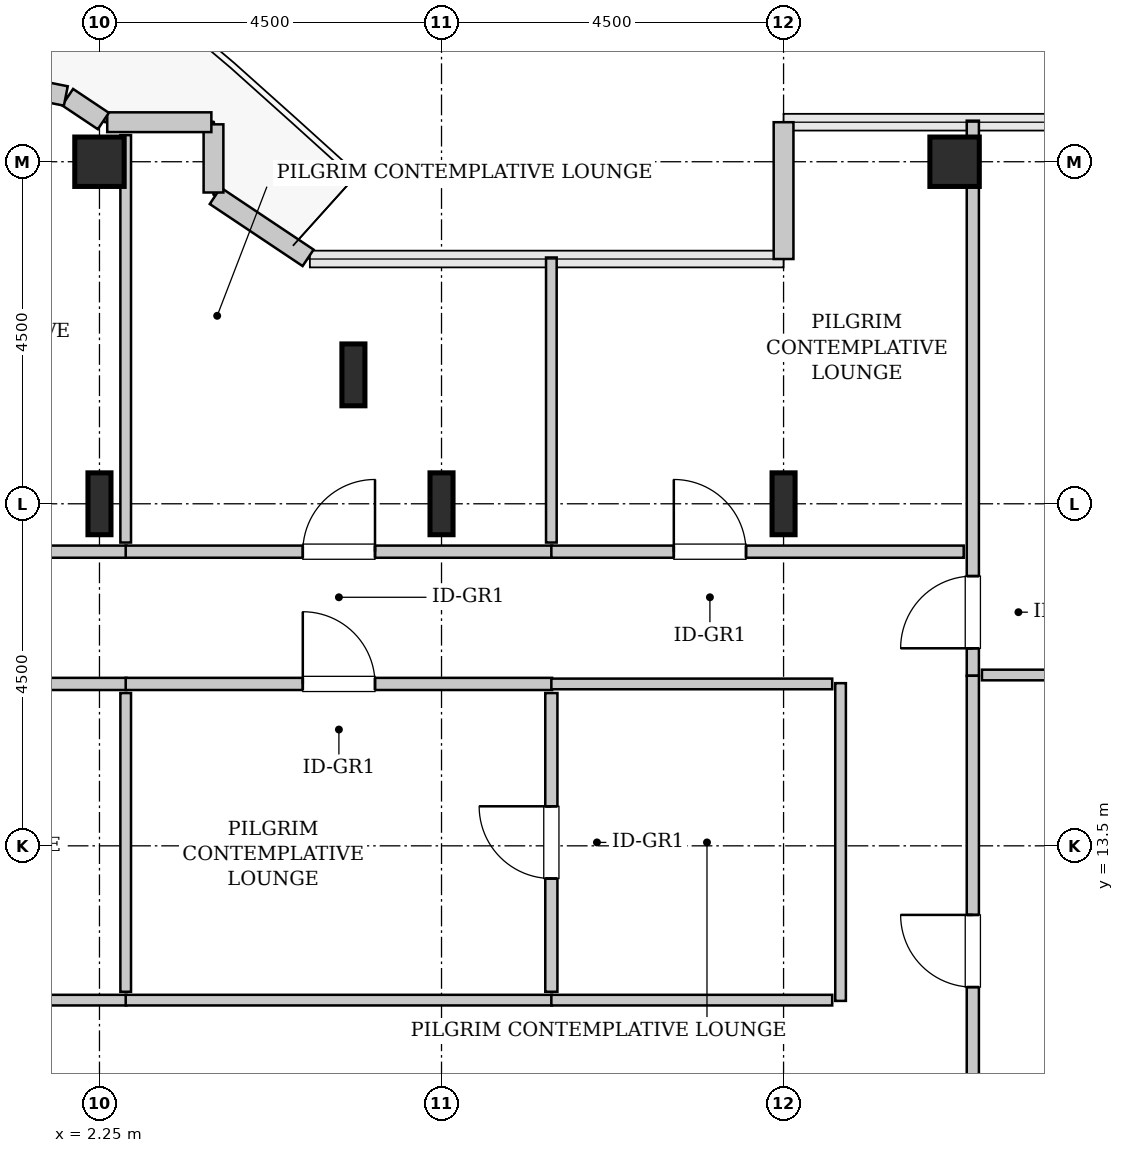
"""IFC4 building model, lengths in metres.
Left out: names, types, materials, properties, quantities, classifications, styles, units other than length and angle.
Written with IfcOpenShell. Run it as: python <this file> out.ifc"""

import sys

from ifc_helpers import new_model, si_unit, direction, frame, frame_2d, origin, origin_2d, place, context, subcontext, project, spatial, rectangle, hollow_rectangle, i_section, extrude, source, transform, mapped, element, fill, save


model = new_model("IFC4")
c1 = context("Model", 3, precision=1e-05, world=origin(), true_north=direction((0.0, 1.0)))
c2 = subcontext(c1, "Body", "Model", "MODEL_VIEW")
j1 = project(units=[si_unit("LENGTHUNIT", "METRE"), si_unit("PLANEANGLEUNIT", "RADIAN")], contexts=[c1])
p1 = place(None, origin())
s1 = spatial("IfcSite", under=j1, at=p1, CompositionType="ELEMENT")
p2 = place(p1, origin())
s2 = spatial("IfcBuilding", under=s1, at=p2, CompositionType="ELEMENT")
p3 = place(p2, frame((0.0, 0.0, 256.0)))
s3 = spatial("IfcBuildingStorey", under=s2, at=p3, CompositionType="ELEMENT", Elevation=256.0)
m1 = source(origin(), c2, "Body", "SweptSolid", [
    extrude(i_section(OverallWidth=0.303, OverallDepth=0.814, WebThickness=0.021, FlangeThickness=0.04, FilletRadius=0.03, at=origin_2d()), origin(), (0.0, 0.0, 1.0), 3.8),
])
p4 = place(p3, frame((2.25, 18.0, 0.0), z_axis=(0.0, 0.0, 1.0), x_axis=(1.0, 0.0, 0.0)))
e1 = element("IfcColumn", 1, at=p4, inside=s3, PredefinedType="COLUMN", context=c2, shape_type="MappedRepresentation", body=[
    mapped(m1, transform((0.0, 0.0, 0.0), x_axis=(1.0, 0.0, 0.0), y_axis=(0.0, 1.0, 0.0), z_axis=(0.0, 0.0, 1.0), scale=1.0)),
])
m2 = source(origin(), c2, "Body", "SweptSolid", [
    extrude(hollow_rectangle(XDim=0.65, YDim=0.65, WallThickness=0.032, InnerFilletRadius=0.032, OuterFilletRadius=0.064, at=origin_2d()), origin(), (0.0, 0.0, 1.0), 3.8),
])
p5 = place(p3, frame((2.25, 22.5, 0.0), z_axis=(0.0, 0.0, 1.0), x_axis=(1.0, 0.0, 0.0)))
e2 = element("IfcColumn", 2, at=p5, inside=s3, PredefinedType="COLUMN", context=c2, shape_type="MappedRepresentation", body=[
    mapped(m2, transform((0.0, 0.0, 0.0), x_axis=(1.0, 0.0, 0.0), y_axis=(0.0, 1.0, 0.0), z_axis=(0.0, 0.0, 1.0), scale=1.0)),
])
for number, where, z_axis, x_axis in (
    (3, (5.591, 19.696, 0.0), (0.0, 0.0, 1.0), (1.0, 0.0, 0.0)),
    (4, (6.75, 18.0, 0.0), (0.0, 0.0, 1.0), (1.0, 0.0, 0.0)),
    (5, (11.25, 18.0, 0.0), (0.0, 0.0, 1.0), (1.0, 0.0, 0.0)),
):
    element("IfcColumn", number, at=place(p3, frame(where, z_axis=z_axis, x_axis=x_axis)), inside=s3, PredefinedType="COLUMN", context=c2, shape_type="MappedRepresentation", body=[
        mapped(m1, transform((0.0, 0.0, 0.0), x_axis=(1.0, 0.0, 0.0), y_axis=(0.0, 1.0, 0.0), z_axis=(0.0, 0.0, 1.0), scale=1.0)),
    ])
p6 = place(p3, frame((13.5, 22.5, 0.0), z_axis=(0.0, 0.0, 1.0), x_axis=(1.0, 0.0, 0.0)))
e6 = element("IfcColumn", 6, at=p6, inside=s3, PredefinedType="COLUMN", context=c2, shape_type="MappedRepresentation", body=[
    mapped(m2, transform((0.0, 0.0, 0.0), x_axis=(1.0, 0.0, 0.0), y_axis=(0.0, 1.0, 0.0), z_axis=(0.0, 0.0, 1.0), scale=1.0)),
])
m3 = source(origin(), c2, "Body", "SweptSolid", [
    extrude(rectangle(XDim=1.8, YDim=0.26, at=frame_2d((0.9, 0.0))), origin(), (0.0, 0.0, 1.0), 3.5),
])
p7 = place(p3, frame((11.25, 23.02, 0.0), z_axis=(0.0, 0.0, 1.0), x_axis=(0.0, -1.0, 0.0)))
e7 = element("IfcWall", 7, at=p7, inside=s3, PredefinedType="SOLIDWALL", context=c2, shape_type="MappedRepresentation", body=[
    mapped(m3, transform((0.0, 0.0, 0.0), x_axis=(1.0, 0.0, 0.0), y_axis=(0.0, 1.0, 0.0), z_axis=(0.0, 0.0, 1.0), scale=1.0)),
])
m4 = source(origin(), c2, "Body", "SweptSolid", [
    extrude(rectangle(XDim=1.469, YDim=0.26, at=frame_2d((0.734, 0.0))), origin(), (0.0, 0.0, 1.0), 3.5),
])
p8 = place(p3, frame((4.995, 21.236, 0.0), z_axis=(0.0, 0.0, 1.0), x_axis=(-0.831461760506, 0.555581983884, 0.0)))
e8 = element("IfcWall", 8, at=p8, inside=s3, PredefinedType="SOLIDWALL", context=c2, shape_type="MappedRepresentation", body=[
    mapped(m4, transform((0.0, 0.0, 0.0), x_axis=(1.0, 0.0, 0.0), y_axis=(0.0, 1.0, 0.0), z_axis=(0.0, 0.0, 1.0), scale=1.0)),
])
m5 = source(origin(), c2, "Body", "SweptSolid", [
    extrude(rectangle(XDim=0.897, YDim=0.26, at=frame_2d((0.448, 0.0))), origin(), (0.0, 0.0, 1.0), 3.5),
])
p9 = place(p3, frame((3.75, 22.095, 0.0), z_axis=(0.0, 0.0, 1.0), x_axis=(0.0, 1.0, 0.0)))
e9 = element("IfcWall", 9, at=p9, inside=s3, PredefinedType="SOLIDWALL", context=c2, shape_type="MappedRepresentation", body=[
    mapped(m5, transform((0.0, 0.0, 0.0), x_axis=(1.0, 0.0, 0.0), y_axis=(0.0, 1.0, 0.0), z_axis=(0.0, 0.0, 1.0), scale=1.0)),
])
m6 = source(origin(), c2, "Body", "SweptSolid", [
    extrude(rectangle(XDim=1.37, YDim=0.26, at=frame_2d((0.685, 0.0))), origin(), (0.0, 0.0, 1.0), 3.5),
])
p10 = place(p3, frame((3.722, 23.02, 0.0), z_axis=(0.0, 0.0, 1.0), x_axis=(-1.0, 0.0, 0.0)))
e10 = element("IfcWall", 10, at=p10, inside=s3, PredefinedType="SOLIDWALL", context=c2, shape_type="MappedRepresentation", body=[
    mapped(m6, transform((0.0, 0.0, 0.0), x_axis=(1.0, 0.0, 0.0), y_axis=(0.0, 1.0, 0.0), z_axis=(0.0, 0.0, 1.0), scale=1.0)),
])
m7 = source(origin(), c2, "Body", "SweptSolid", [
    extrude(rectangle(XDim=0.565, YDim=0.26, at=frame_2d((0.283, 0.0))), origin(), (0.0, 0.0, 1.0), 3.5),
])
p11 = place(p3, frame((2.301, 23.036, 0.0), z_axis=(0.0, 0.0, 1.0), x_axis=(-0.831651492666, 0.555297933317, 0.0)))
e11 = element("IfcWall", 11, at=p11, inside=s3, PredefinedType="SOLIDWALL", context=c2, shape_type="MappedRepresentation", body=[
    mapped(m7, transform((0.0, 0.0, 0.0), x_axis=(1.0, 0.0, 0.0), y_axis=(0.0, 1.0, 0.0), z_axis=(0.0, 0.0, 1.0), scale=1.0)),
])
m8 = source(origin(), c2, "Body", "SweptSolid", [
    extrude(rectangle(XDim=4.137, YDim=0.26, at=frame_2d((2.068, 0.0))), origin(), (0.0, 0.0, 1.0), 3.5),
])
p12 = place(p3, frame((1.807, 23.365, 0.0), z_axis=(0.0, 0.0, 1.0), x_axis=(-0.980782170794, 0.195105954428, 0.0)))
e12 = element("IfcWall", 12, at=p12, inside=s3, PredefinedType="SOLIDWALL", context=c2, shape_type="MappedRepresentation", body=[
    mapped(m8, transform((0.0, 0.0, 0.0), x_axis=(1.0, 0.0, 0.0), y_axis=(0.0, 1.0, 0.0), z_axis=(0.0, 0.0, 1.0), scale=1.0)),
])
p13 = place(p12, frame((0.488, 0.0, 0.0)))
e13 = element("IfcOpeningElement", 13, at=p13, cuts=e12, PredefinedType="OPENING", context=c2, shape_type="SweptSolid", body=[
    extrude(rectangle(XDim=1.1, YDim=2.2, at=frame_2d((0.55, 1.1))), frame((0.0, 0.14, 0.0), z_axis=(0.0, -1.0, 0.0), x_axis=(1.0, 0.0, 0.0)), (0.0, 0.0, 1.0), 0.28),
])
m9 = source(origin(), c2, "Body", "SweptSolid", [
    extrude(rectangle(XDim=7.302, YDim=0.16, at=frame_2d((3.651, 0.0))), origin(), (0.0, 0.0, 1.0), 3.485),
])
p14 = place(p3, frame((13.74, 15.738, 0.0), z_axis=(0.0, 0.0, 1.0), x_axis=(0.0, 1.0, 0.0)))
e14 = element("IfcWall", 14, at=p14, inside=s3, PredefinedType="PARTITIONING", context=c2, shape_type="MappedRepresentation", body=[
    mapped(m9, transform((0.0, 0.0, 0.0), x_axis=(1.0, 0.0, 0.0), y_axis=(0.0, 1.0, 0.0), z_axis=(0.0, 0.0, 1.0), scale=1.0)),
])
p15 = place(p14, frame((0.361, 0.0, 0.0)))
e15 = element("IfcOpeningElement", 15, at=p15, cuts=e14, PredefinedType="OPENING", context=c2, shape_type="SweptSolid", body=[
    extrude(rectangle(XDim=0.95, YDim=2.1, at=frame_2d((0.475, 1.05))), frame((0.0, 0.09, 0.0), z_axis=(0.0, -1.0, 0.0), x_axis=(1.0, 0.0, 0.0)), (0.0, 0.0, 1.0), 0.18),
])
m10 = source(origin(), c2, "Body", "SweptSolid", [
    extrude(rectangle(XDim=11.43, YDim=0.14, at=frame_2d((5.715, 0.0))), origin(), (0.0, 0.0, 1.0), 3.485),
])
p16 = place(p3, frame((13.86, 15.748, 0.0), z_axis=(0.0, 0.0, 1.0), x_axis=(1.0, 0.0, 0.0)))
e16 = element("IfcWall", 16, at=p16, inside=s3, PredefinedType="PARTITIONING", context=c2, shape_type="MappedRepresentation", body=[
    mapped(m10, transform((0.0, 0.0, 0.0), x_axis=(1.0, 0.0, 0.0), y_axis=(0.0, 1.0, 0.0), z_axis=(0.0, 0.0, 1.0), scale=1.0)),
])
m11 = source(origin(), c2, "Body", "SweptSolid", [
    extrude(rectangle(XDim=7.242, YDim=0.16, at=frame_2d((3.621, 0.0))), origin(), (0.0, 0.0, 1.0), 3.485),
])
p17 = place(p3, frame((13.74, 8.495, 0.0), z_axis=(0.0, 0.0, 1.0), x_axis=(0.0, 1.0, 0.0)))
e17 = element("IfcWall", 17, at=p17, inside=s3, PredefinedType="PARTITIONING", context=c2, shape_type="MappedRepresentation", body=[
    mapped(m11, transform((0.0, 0.0, 0.0), x_axis=(1.0, 0.0, 0.0), y_axis=(0.0, 1.0, 0.0), z_axis=(0.0, 0.0, 1.0), scale=1.0)),
])
p18 = place(p17, frame((3.146, 0.0, 0.0)))
e18 = element("IfcOpeningElement", 18, at=p18, cuts=e17, PredefinedType="OPENING", context=c2, shape_type="SweptSolid", body=[
    extrude(rectangle(XDim=0.95, YDim=2.1, at=frame_2d((0.475, 1.05))), frame((0.0, 0.09, 0.0), z_axis=(0.0, -1.0, 0.0), x_axis=(1.0, 0.0, 0.0)), (0.0, 0.0, 1.0), 0.18),
])
m12 = source(origin(), c2, "Body", "SweptSolid", [
    extrude(rectangle(XDim=7.01, YDim=0.16, at=frame_2d((3.505, 0.0))), origin(), (0.0, 0.0, 1.0), 3.485),
])
p19 = place(p3, frame((-4.405, 17.37, 0.0), z_axis=(0.0, 0.0, 1.0), x_axis=(1.0, 0.0, 0.0)))
e19 = element("IfcWall", 19, at=p19, inside=s3, PredefinedType="PARTITIONING", context=c2, shape_type="MappedRepresentation", body=[
    mapped(m12, transform((0.0, 0.0, 0.0), x_axis=(1.0, 0.0, 0.0), y_axis=(0.0, 1.0, 0.0), z_axis=(0.0, 0.0, 1.0), scale=1.0)),
])
p20 = place(p19, frame((3.03, 0.0, 0.0)))
e20 = element("IfcOpeningElement", 20, at=p20, cuts=e19, PredefinedType="OPENING", context=c2, shape_type="SweptSolid", body=[
    extrude(rectangle(XDim=0.95, YDim=2.1, at=frame_2d((0.475, 1.05))), frame((0.0, 0.09, 0.0), z_axis=(0.0, -1.0, 0.0), x_axis=(1.0, 0.0, 0.0)), (0.0, 0.0, 1.0), 0.18),
])
m13 = source(origin(), c2, "Body", "SweptSolid", [
    extrude(rectangle(XDim=5.36, YDim=0.14, at=frame_2d((2.68, 0.0))), origin(), (0.0, 0.0, 1.0), 2.875),
])
p21 = place(p3, frame((2.595, 17.49, 0.0), z_axis=(0.0, 0.0, 1.0), x_axis=(0.0, 1.0, 0.0)))
e21 = element("IfcWall", 21, at=p21, inside=s3, PredefinedType="PARTITIONING", context=c2, shape_type="MappedRepresentation", body=[
    mapped(m13, transform((0.0, 0.0, 0.0), x_axis=(1.0, 0.0, 0.0), y_axis=(0.0, 1.0, 0.0), z_axis=(0.0, 0.0, 1.0), scale=1.0)),
])
p22 = place(p3, frame((-4.405, 15.63, 0.0), z_axis=(0.0, 0.0, 1.0), x_axis=(1.0, 0.0, 0.0)))
e22 = element("IfcWall", 22, at=p22, inside=s3, PredefinedType="PARTITIONING", context=c2, shape_type="MappedRepresentation", body=[
    mapped(m12, transform((0.0, 0.0, 0.0), x_axis=(1.0, 0.0, 0.0), y_axis=(0.0, 1.0, 0.0), z_axis=(0.0, 0.0, 1.0), scale=1.0)),
])
p23 = place(p22, frame((3.03, 0.0, 0.0)))
e23 = element("IfcOpeningElement", 23, at=p23, cuts=e22, PredefinedType="OPENING", context=c2, shape_type="SweptSolid", body=[
    extrude(rectangle(XDim=0.95, YDim=2.1, at=frame_2d((0.475, 1.05))), frame((0.0, 0.09, 0.0), z_axis=(0.0, -1.0, 0.0), x_axis=(1.0, 0.0, 0.0)), (0.0, 0.0, 1.0), 0.18),
])
m14 = source(origin(), c2, "Body", "SweptSolid", [
    extrude(rectangle(XDim=7.01, YDim=0.14, at=frame_2d((3.505, 0.0))), origin(), (0.0, 0.0, 1.0), 3.485),
])
p24 = place(p3, frame((-4.405, 11.47, 0.0), z_axis=(0.0, 0.0, 1.0), x_axis=(1.0, 0.0, 0.0)))
e24 = element("IfcWall", 24, at=p24, inside=s3, PredefinedType="PARTITIONING", context=c2, shape_type="MappedRepresentation", body=[
    mapped(m14, transform((0.0, 0.0, 0.0), x_axis=(1.0, 0.0, 0.0), y_axis=(0.0, 1.0, 0.0), z_axis=(0.0, 0.0, 1.0), scale=1.0)),
])
m15 = source(origin(), c2, "Body", "SweptSolid", [
    extrude(rectangle(XDim=3.93, YDim=0.14, at=frame_2d((1.965, 0.0))), origin(), (0.0, 0.0, 1.0), 3.485),
])
p25 = place(p3, frame((2.595, 11.58, 0.0), z_axis=(0.0, 0.0, 1.0), x_axis=(0.0, 1.0, 0.0)))
e25 = element("IfcWall", 25, at=p25, inside=s3, PredefinedType="PARTITIONING", context=c2, shape_type="MappedRepresentation", body=[
    mapped(m15, transform((0.0, 0.0, 0.0), x_axis=(1.0, 0.0, 0.0), y_axis=(0.0, 1.0, 0.0), z_axis=(0.0, 0.0, 1.0), scale=1.0)),
])
m16 = source(origin(), c2, "Body", "SweptSolid", [
    extrude(rectangle(XDim=5.61, YDim=0.16, at=frame_2d((2.805, 0.0))), origin(), (0.0, 0.0, 1.0), 3.485),
])
p26 = place(p3, frame((2.595, 17.37, 0.0), z_axis=(0.0, 0.0, 1.0), x_axis=(1.0, 0.0, 0.0)))
e26 = element("IfcWall", 26, at=p26, inside=s3, PredefinedType="PARTITIONING", context=c2, shape_type="MappedRepresentation", body=[
    mapped(m16, transform((0.0, 0.0, 0.0), x_axis=(1.0, 0.0, 0.0), y_axis=(0.0, 1.0, 0.0), z_axis=(0.0, 0.0, 1.0), scale=1.0)),
])
p27 = place(p26, frame((2.33, 0.0, 0.0)))
e27 = element("IfcOpeningElement", 27, at=p27, cuts=e26, PredefinedType="OPENING", context=c2, shape_type="SweptSolid", body=[
    extrude(rectangle(XDim=0.95, YDim=2.1, at=frame_2d((0.475, 1.05))), frame((0.0, 0.09, 0.0), z_axis=(0.0, -1.0, 0.0), x_axis=(1.0, 0.0, 0.0)), (0.0, 0.0, 1.0), 0.18),
])
m17 = source(origin(), c2, "Body", "SweptSolid", [
    extrude(rectangle(XDim=3.75, YDim=0.14, at=frame_2d((1.875, 0.0))), origin(), (0.0, 0.0, 1.0), 3.485),
])
p28 = place(p3, frame((8.195, 17.49, 0.0), z_axis=(0.0, 0.0, 1.0), x_axis=(0.0, 1.0, 0.0)))
e28 = element("IfcWall", 28, at=p28, inside=s3, PredefinedType="PARTITIONING", context=c2, shape_type="MappedRepresentation", body=[
    mapped(m17, transform((0.0, 0.0, 0.0), x_axis=(1.0, 0.0, 0.0), y_axis=(0.0, 1.0, 0.0), z_axis=(0.0, 0.0, 1.0), scale=1.0)),
])
p29 = place(p3, frame((2.595, 15.63, 0.0), z_axis=(0.0, 0.0, 1.0), x_axis=(1.0, 0.0, 0.0)))
e29 = element("IfcWall", 29, at=p29, inside=s3, PredefinedType="PARTITIONING", context=c2, shape_type="MappedRepresentation", body=[
    mapped(m16, transform((0.0, 0.0, 0.0), x_axis=(1.0, 0.0, 0.0), y_axis=(0.0, 1.0, 0.0), z_axis=(0.0, 0.0, 1.0), scale=1.0)),
])
p30 = place(p29, frame((2.33, 0.0, 0.0)))
e30 = element("IfcOpeningElement", 30, at=p30, cuts=e29, PredefinedType="OPENING", context=c2, shape_type="SweptSolid", body=[
    extrude(rectangle(XDim=0.95, YDim=2.1, at=frame_2d((0.475, 1.05))), frame((0.0, 0.09, 0.0), z_axis=(0.0, -1.0, 0.0), x_axis=(1.0, 0.0, 0.0)), (0.0, 0.0, 1.0), 0.18),
])
m18 = source(origin(), c2, "Body", "SweptSolid", [
    extrude(rectangle(XDim=5.61, YDim=0.14, at=frame_2d((2.805, 0.0))), origin(), (0.0, 0.0, 1.0), 3.485),
])
p31 = place(p3, frame((2.595, 11.47, 0.0), z_axis=(0.0, 0.0, 1.0), x_axis=(1.0, 0.0, 0.0)))
e31 = element("IfcWall", 31, at=p31, inside=s3, PredefinedType="PARTITIONING", context=c2, shape_type="MappedRepresentation", body=[
    mapped(m18, transform((0.0, 0.0, 0.0), x_axis=(1.0, 0.0, 0.0), y_axis=(0.0, 1.0, 0.0), z_axis=(0.0, 0.0, 1.0), scale=1.0)),
])
m19 = source(origin(), c2, "Body", "SweptSolid", [
    extrude(rectangle(XDim=3.93, YDim=0.16, at=frame_2d((1.965, 0.0))), origin(), (0.0, 0.0, 1.0), 3.485),
])
p32 = place(p3, frame((8.195, 11.58, 0.0), z_axis=(0.0, 0.0, 1.0), x_axis=(0.0, 1.0, 0.0)))
e32 = element("IfcWall", 32, at=p32, inside=s3, PredefinedType="PARTITIONING", context=c2, shape_type="MappedRepresentation", body=[
    mapped(m19, transform((0.0, 0.0, 0.0), x_axis=(1.0, 0.0, 0.0), y_axis=(0.0, 1.0, 0.0), z_axis=(0.0, 0.0, 1.0), scale=1.0)),
])
p33 = place(p32, frame((1.49, 0.0, 0.0)))
e33 = element("IfcOpeningElement", 33, at=p33, cuts=e32, PredefinedType="OPENING", context=c2, shape_type="SweptSolid", body=[
    extrude(rectangle(XDim=0.95, YDim=2.1, at=frame_2d((0.475, 1.05))), frame((0.0, 0.09, 0.0), z_axis=(0.0, -1.0, 0.0), x_axis=(1.0, 0.0, 0.0)), (0.0, 0.0, 1.0), 0.18),
])
m20 = source(origin(), c2, "Body", "SweptSolid", [
    extrude(rectangle(XDim=5.425, YDim=0.16, at=frame_2d((2.712, 0.0))), origin(), (0.0, 0.0, 1.0), 3.485),
])
p34 = place(p3, frame((8.195, 17.37, 0.0), z_axis=(0.0, 0.0, 1.0), x_axis=(1.0, 0.0, 0.0)))
e34 = element("IfcWall", 34, at=p34, inside=s3, PredefinedType="PARTITIONING", context=c2, shape_type="MappedRepresentation", body=[
    mapped(m20, transform((0.0, 0.0, 0.0), x_axis=(1.0, 0.0, 0.0), y_axis=(0.0, 1.0, 0.0), z_axis=(0.0, 0.0, 1.0), scale=1.0)),
])
p35 = place(p34, frame((1.611, 0.0, 0.0)))
e35 = element("IfcOpeningElement", 35, at=p35, cuts=e34, PredefinedType="OPENING", context=c2, shape_type="SweptSolid", body=[
    extrude(rectangle(XDim=0.95, YDim=2.1, at=frame_2d((0.475, 1.05))), frame((0.0, 0.09, 0.0), z_axis=(0.0, -1.0, 0.0), x_axis=(1.0, 0.0, 0.0)), (0.0, 0.0, 1.0), 0.18),
])
m21 = source(origin(), c2, "Body", "SweptSolid", [
    extrude(rectangle(XDim=4.18, YDim=0.14, at=frame_2d((2.09, 0.0))), origin(), (0.0, 0.0, 1.0), 3.485),
])
p36 = place(p3, frame((12.0, 11.46, 0.0), z_axis=(0.0, 0.0, 1.0), x_axis=(0.0, 1.0, 0.0)))
e36 = element("IfcWall", 36, at=p36, inside=s3, PredefinedType="PARTITIONING", context=c2, shape_type="MappedRepresentation", body=[
    mapped(m21, transform((0.0, 0.0, 0.0), x_axis=(1.0, 0.0, 0.0), y_axis=(0.0, 1.0, 0.0), z_axis=(0.0, 0.0, 1.0), scale=1.0)),
])
m22 = source(origin(), c2, "Body", "SweptSolid", [
    extrude(rectangle(XDim=3.695, YDim=0.14, at=frame_2d((1.847, 0.0))), origin(), (0.0, 0.0, 1.0), 3.485),
])
for number, where, z_axis, x_axis in (
    (37, (8.195, 15.63, 0.0), (0.0, 0.0, 1.0), (1.0, 0.0, 0.0)),
    (38, (8.195, 11.47, 0.0), (0.0, 0.0, 1.0), (1.0, 0.0, 0.0)),
):
    element("IfcWall", number, at=place(p3, frame(where, z_axis=z_axis, x_axis=x_axis)), inside=s3, PredefinedType="PARTITIONING", context=c2, shape_type="MappedRepresentation", body=[
        mapped(m22, transform((0.0, 0.0, 0.0), x_axis=(1.0, 0.0, 0.0), y_axis=(0.0, 1.0, 0.0), z_axis=(0.0, 0.0, 1.0), scale=1.0)),
    ])
m23 = source(origin(), c2, "Body", "SweptSolid", [
    extrude(rectangle(XDim=0.95, YDim=2.1, at=frame_2d((0.475, 1.05))), frame((0.0, 0.025, 0.0), z_axis=(0.0, -1.0, 0.0), x_axis=(1.0, 0.0, 0.0)), (0.0, 0.0, 1.0), 0.05),
])
p37 = place(p15, origin())
e39 = element("IfcDoor", 39, at=p37, inside=s3, OperationType="SINGLE_SWING_LEFT", PredefinedType="DOOR", context=c2, shape_type="MappedRepresentation", body=[
    mapped(m23, transform((0.0, 0.0, 0.0), x_axis=(1.0, 0.0, 0.0), y_axis=(0.0, 1.0, 0.0), z_axis=(0.0, 0.0, 1.0), scale=1.0)),
])
fill(e15, e39)
p38 = place(p18, origin())
e40 = element("IfcDoor", 40, at=p38, inside=s3, OperationType="SINGLE_SWING_RIGHT", PredefinedType="DOOR", context=c2, shape_type="MappedRepresentation", body=[
    mapped(m23, transform((0.0, 0.0, 0.0), x_axis=(1.0, 0.0, 0.0), y_axis=(0.0, 1.0, 0.0), z_axis=(0.0, 0.0, 1.0), scale=1.0)),
])
fill(e18, e40)
p39 = place(p27, origin())
e41 = element("IfcDoor", 41, at=p39, inside=s3, OperationType="SINGLE_SWING_RIGHT", PredefinedType="DOOR", context=c2, shape_type="MappedRepresentation", body=[
    mapped(m23, transform((0.0, 0.0, 0.0), x_axis=(1.0, 0.0, 0.0), y_axis=(0.0, 1.0, 0.0), z_axis=(0.0, 0.0, 1.0), scale=1.0)),
])
fill(e27, e41)
p40 = place(p30, origin())
e42 = element("IfcDoor", 42, at=p40, inside=s3, OperationType="SINGLE_SWING_LEFT", PredefinedType="DOOR", context=c2, shape_type="MappedRepresentation", body=[
    mapped(m23, transform((0.0, 0.0, 0.0), x_axis=(1.0, 0.0, 0.0), y_axis=(0.0, 1.0, 0.0), z_axis=(0.0, 0.0, 1.0), scale=1.0)),
])
fill(e30, e42)
p41 = place(p33, origin())
e43 = element("IfcDoor", 43, at=p41, inside=s3, OperationType="SINGLE_SWING_RIGHT", PredefinedType="DOOR", context=c2, shape_type="MappedRepresentation", body=[
    mapped(m23, transform((0.0, 0.0, 0.0), x_axis=(1.0, 0.0, 0.0), y_axis=(0.0, 1.0, 0.0), z_axis=(0.0, 0.0, 1.0), scale=1.0)),
])
fill(e33, e43)
p42 = place(p35, origin())
e44 = element("IfcDoor", 44, at=p42, inside=s3, OperationType="SINGLE_SWING_LEFT", PredefinedType="DOOR", context=c2, shape_type="MappedRepresentation", body=[
    mapped(m23, transform((0.0, 0.0, 0.0), x_axis=(1.0, 0.0, 0.0), y_axis=(0.0, 1.0, 0.0), z_axis=(0.0, 0.0, 1.0), scale=1.0)),
])
fill(e35, e44)
save(model, sys.argv[1])
